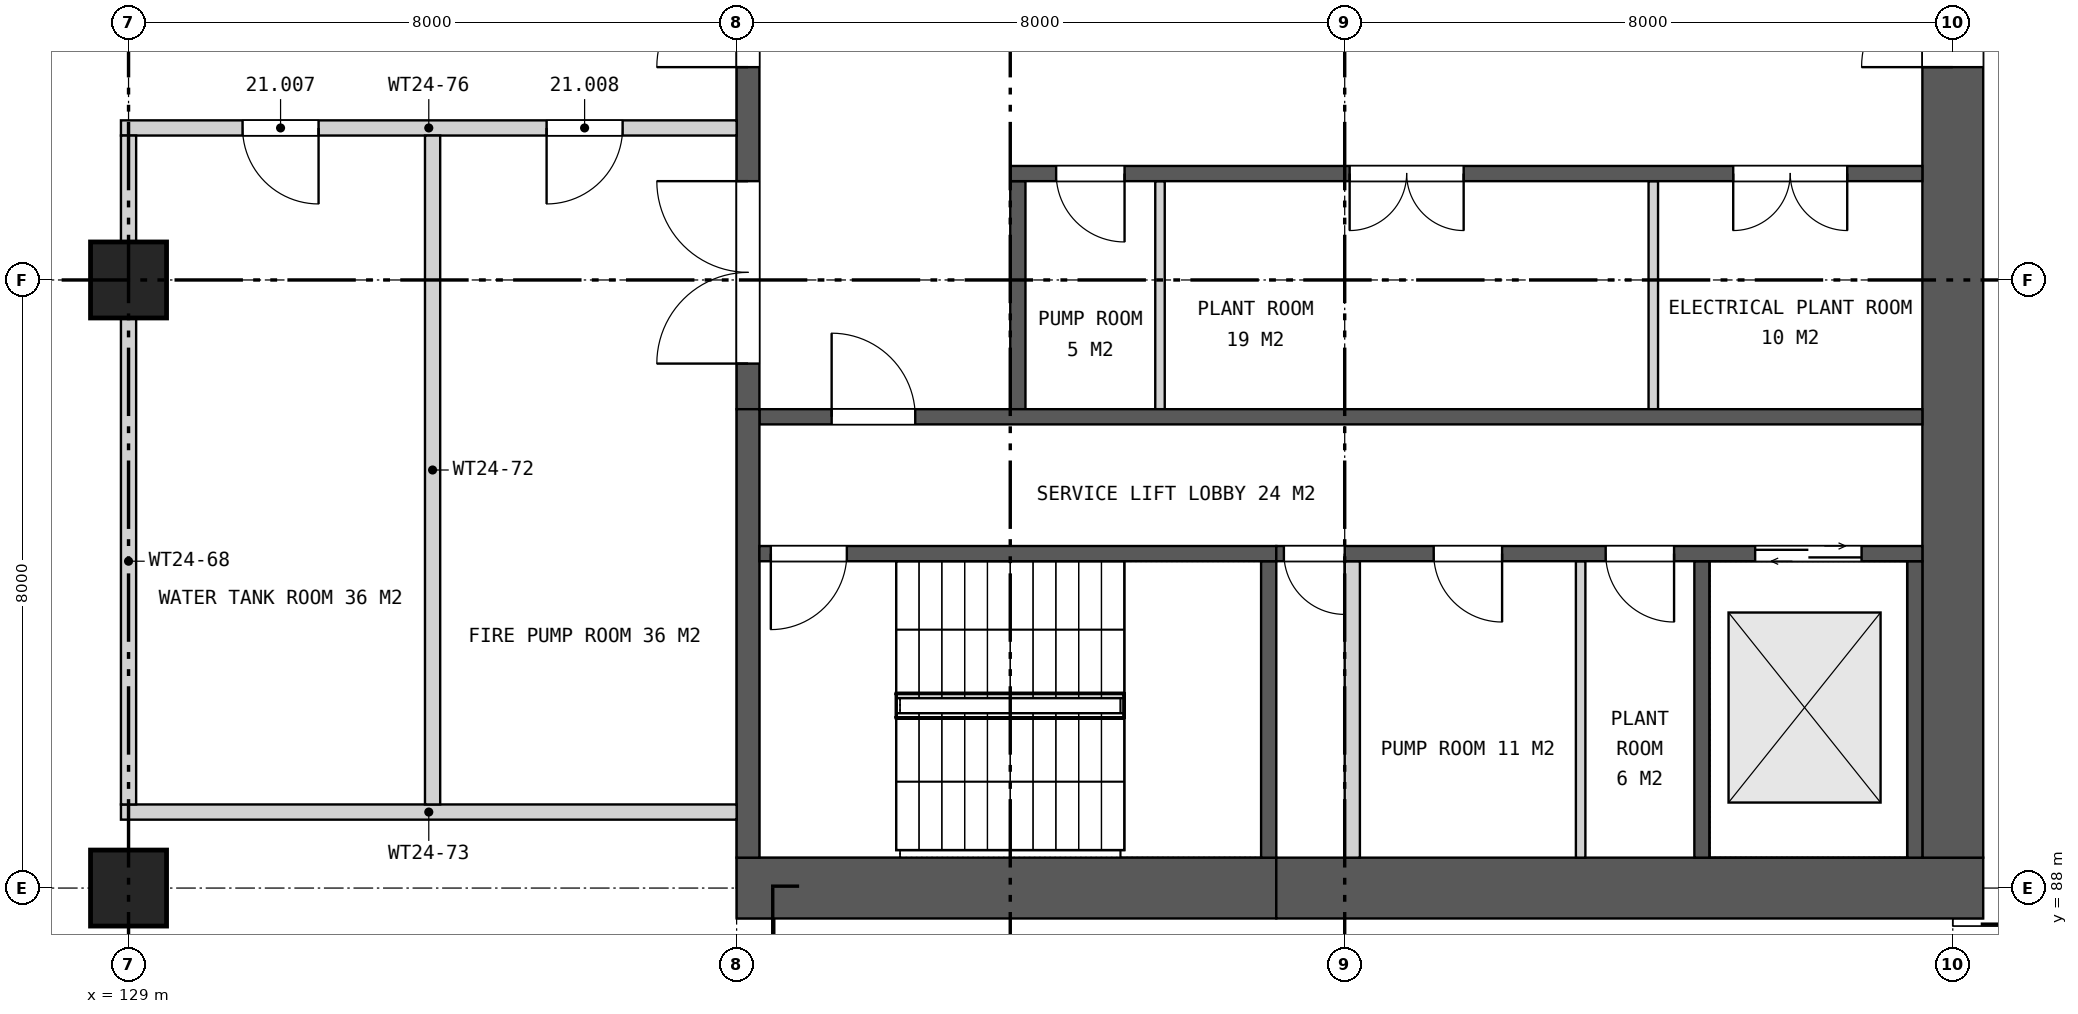
"""IFC4 building model, lengths in metres.
Left out: names, types, materials, properties, quantities, classifications, styles, units other than length and angle.
Written with IfcOpenShell. Run it as: python <this file> out.ifc"""

import sys

from ifc_helpers import new_model, si_unit, direction, frame, frame_2d, origin, origin_2d, place, context, subcontext, project, spatial, rectangle, extrude, element, fill, save


model = new_model("IFC4")
c1 = context("Model", 3, precision=1e-05, world=origin(), true_north=direction((0.0, 1.0)))
c2 = subcontext(c1, "Body", "Model", "MODEL_VIEW")
j1 = project(units=[si_unit("LENGTHUNIT", "METRE"), si_unit("PLANEANGLEUNIT", "RADIAN")], contexts=[c1])
p1 = place(None, origin())
s1 = spatial("IfcSite", under=j1, at=p1, CompositionType="ELEMENT")
p2 = place(p1, origin())
s2 = spatial("IfcBuilding", under=s1, at=p2, CompositionType="ELEMENT")
p3 = place(p2, frame((0.0, 0.0, 105.3)))
s3 = spatial("IfcBuildingStorey", under=s2, at=p3, CompositionType="ELEMENT", Elevation=105.3)
for number, where, z_axis, x_axis in (
    (1, (129.0, 88.0, 0.0), (0.0, 0.0, 1.0), (1.0, 0.0, 0.0)),
    (2, (129.0, 96.0, 0.0), (0.0, 0.0, 1.0), (1.0, 0.0, 0.0)),
):
    element("IfcColumn", number, at=place(p3, frame(where, z_axis=z_axis, x_axis=x_axis)), inside=s3, PredefinedType="COLUMN", context=c2, shape_type="SweptSolid", body=[
        extrude(rectangle(XDim=1.0, YDim=1.0, at=origin_2d()), origin(), (0.0, 0.0, 1.0), 7.4),
    ])
p4 = place(p3, frame((137.0, 88.0, 0.0), z_axis=(0.0, 0.0, 1.0), x_axis=(1.0, 0.0, 0.0)))
e3 = element("IfcWall", 3, at=p4, inside=s3, PredefinedType="SHEAR", context=c2, shape_type="SweptSolid", body=[
    extrude(rectangle(XDim=7.1, YDim=0.8, at=frame_2d((3.55, 0.0))), origin(), (0.0, 0.0, 1.0), 7.4),
])
p5 = place(p3, frame((144.1, 88.0, 0.0), z_axis=(0.0, 0.0, 1.0), x_axis=(1.0, 0.0, 0.0)))
e4 = element("IfcWall", 4, at=p5, inside=s3, PredefinedType="SHEAR", context=c2, shape_type="SweptSolid", body=[
    extrude(rectangle(XDim=9.3, YDim=0.8, at=frame_2d((4.65, 0.0))), origin(), (0.0, 0.0, 1.0), 7.4),
])
p6 = place(p3, frame((153.0, 88.4, 0.0), z_axis=(0.0, 0.0, 1.0), x_axis=(0.0, 1.0, 0.0)))
e5 = element("IfcWall", 5, at=p6, inside=s3, PredefinedType="SHEAR", context=c2, shape_type="SweptSolid", body=[
    extrude(rectangle(XDim=23.2, YDim=0.8, at=frame_2d((11.6, 0.0))), origin(), (0.0, 0.0, 1.0), 7.4),
])
p7 = place(p6, frame((10.4, 0.0, 0.0)))
e6 = element("IfcOpeningElement", 6, at=p7, cuts=e5, PredefinedType="OPENING", context=c2, shape_type="SweptSolid", body=[
    extrude(rectangle(XDim=2.4, YDim=2.4, at=frame_2d((1.2, 1.2))), frame((0.0, 0.41, 0.0), z_axis=(0.0, -1.0, 0.0), x_axis=(1.0, 0.0, 0.0)), (0.0, 0.0, 1.0), 0.82),
])
p8 = place(p3, frame((137.15, 94.3, 0.0), z_axis=(0.0, 0.0, 1.0), x_axis=(0.0, 1.0, 0.0)))
e7 = element("IfcWall", 7, at=p8, inside=s3, PredefinedType="SHEAR", context=c2, shape_type="SweptSolid", body=[
    extrude(rectangle(XDim=11.4, YDim=0.3, at=frame_2d((5.7, 0.0))), origin(), (0.0, 0.0, 1.0), 7.4),
])
p9 = place(p8, frame((0.6, 0.0, 0.0)))
e8 = element("IfcOpeningElement", 8, at=p9, cuts=e7, PredefinedType="OPENING", context=c2, shape_type="SweptSolid", body=[
    extrude(rectangle(XDim=2.4, YDim=2.4, at=frame_2d((1.2, 1.2))), frame((0.0, 0.16, 0.0), z_axis=(0.0, -1.0, 0.0), x_axis=(1.0, 0.0, 0.0)), (0.0, 0.0, 1.0), 0.32),
])
p10 = place(p8, frame((4.5, 0.0, 0.0)))
e9 = element("IfcOpeningElement", 9, at=p10, cuts=e7, PredefinedType="OPENING", context=c2, shape_type="SweptSolid", body=[
    extrude(rectangle(XDim=2.4, YDim=2.4, at=frame_2d((1.2, 1.2))), frame((0.0, 0.16, 0.0), z_axis=(0.0, -1.0, 0.0), x_axis=(1.0, 0.0, 0.0)), (0.0, 0.0, 1.0), 0.32),
])
p11 = place(p8, frame((8.4, 0.0, 0.0)))
e10 = element("IfcOpeningElement", 10, at=p11, cuts=e7, PredefinedType="OPENING", context=c2, shape_type="SweptSolid", body=[
    extrude(rectangle(XDim=2.4, YDim=2.4, at=frame_2d((1.2, 1.2))), frame((0.0, 0.16, 0.0), z_axis=(0.0, -1.0, 0.0), x_axis=(1.0, 0.0, 0.0)), (0.0, 0.0, 1.0), 0.32),
])
p12 = place(p3, frame((140.7, 94.3, 0.0), z_axis=(0.0, 0.0, 1.0), x_axis=(0.0, 1.0, 0.0)))
e11 = element("IfcWall", 11, at=p12, inside=s3, PredefinedType="SHEAR", context=c2, shape_type="SweptSolid", body=[
    extrude(rectangle(XDim=3.0, YDim=0.2, at=frame_2d((1.5, 0.0))), origin(), (0.0, 0.0, 1.0), 7.4),
])
for number, where, z_axis, x_axis in (
    (12, (142.57, 94.3, 0.0), (0.0, 0.0, 1.0), (0.0, 1.0, 0.0)),
    (13, (149.06, 94.3, 0.0), (0.0, 0.0, 1.0), (0.0, 1.0, 0.0)),
):
    element("IfcWall", number, at=place(p3, frame(where, z_axis=z_axis, x_axis=x_axis)), inside=s3, PredefinedType="PARTITIONING", context=c2, shape_type="SweptSolid", body=[
        extrude(rectangle(XDim=3.0, YDim=0.125, at=frame_2d((1.5, 0.0))), origin(), (0.0, 0.0, 1.0), 7.4),
    ])
p13 = place(p3, frame((140.6, 97.4, 0.0), z_axis=(0.0, 0.0, 1.0), x_axis=(1.0, 0.0, 0.0)))
e14 = element("IfcWall", 14, at=p13, inside=s3, PredefinedType="SHEAR", context=c2, shape_type="SweptSolid", body=[
    extrude(rectangle(XDim=12.0, YDim=0.2, at=frame_2d((6.0, 0.0))), origin(), (0.0, 0.0, 1.0), 7.4),
])
p14 = place(p13, frame((0.604, 0.0, 0.0)))
e15 = element("IfcOpeningElement", 15, at=p14, cuts=e14, PredefinedType="OPENING", context=c2, shape_type="SweptSolid", body=[
    extrude(rectangle(XDim=0.9, YDim=2.1, at=frame_2d((0.45, 1.05))), frame((0.0, 0.11, 0.0), z_axis=(0.0, -1.0, 0.0), x_axis=(1.0, 0.0, 0.0)), (0.0, 0.0, 1.0), 0.22),
])
p15 = place(p13, frame((4.465, 0.0, 0.0)))
e16 = element("IfcOpeningElement", 16, at=p15, cuts=e14, PredefinedType="OPENING", context=c2, shape_type="SweptSolid", body=[
    extrude(rectangle(XDim=1.5, YDim=2.1, at=frame_2d((0.75, 1.05))), frame((0.0, 0.11, 0.0), z_axis=(0.0, -1.0, 0.0), x_axis=(1.0, 0.0, 0.0)), (0.0, 0.0, 1.0), 0.22),
])
p16 = place(p13, frame((9.511, 0.0, 0.0)))
e17 = element("IfcOpeningElement", 17, at=p16, cuts=e14, PredefinedType="OPENING", context=c2, shape_type="SweptSolid", body=[
    extrude(rectangle(XDim=1.5, YDim=2.1, at=frame_2d((0.75, 1.05))), frame((0.0, 0.11, 0.0), z_axis=(0.0, -1.0, 0.0), x_axis=(1.0, 0.0, 0.0)), (0.0, 0.0, 1.0), 0.22),
])
p17 = place(p3, frame((137.3, 94.2, 0.0), z_axis=(0.0, 0.0, 1.0), x_axis=(1.0, 0.0, 0.0)))
e18 = element("IfcWall", 18, at=p17, inside=s3, PredefinedType="SHEAR", context=c2, shape_type="SweptSolid", body=[
    extrude(rectangle(XDim=15.3, YDim=0.2, at=frame_2d((7.65, 0.0))), origin(), (0.0, 0.0, 1.0), 7.4),
])
p18 = place(p17, frame((0.95, 0.0, 0.0)))
e19 = element("IfcOpeningElement", 19, at=p18, cuts=e18, PredefinedType="OPENING", context=c2, shape_type="SweptSolid", body=[
    extrude(rectangle(XDim=1.1, YDim=2.1, at=frame_2d((0.55, 1.05))), frame((0.0, 0.11, 0.0), z_axis=(0.0, -1.0, 0.0), x_axis=(1.0, 0.0, 0.0)), (0.0, 0.0, 1.0), 0.22),
])
p19 = place(p3, frame((137.15, 88.4, 0.0), z_axis=(0.0, 0.0, 1.0), x_axis=(0.0, 1.0, 0.0)))
e20 = element("IfcWall", 20, at=p19, inside=s3, PredefinedType="SHEAR", context=c2, shape_type="SweptSolid", body=[
    extrude(rectangle(XDim=5.9, YDim=0.3, at=frame_2d((2.95, 0.0))), origin(), (0.0, 0.0, 1.0), 7.4),
])
for number, where, z_axis, x_axis in (
    (21, (144.0, 88.4, 0.0), (0.0, 0.0, 1.0), (0.0, 1.0, 0.0)),
    (22, (149.7, 88.4, 0.0), (0.0, 0.0, 1.0), (0.0, 1.0, 0.0)),
    (23, (152.5, 88.4, 0.0), (0.0, 0.0, 1.0), (0.0, 1.0, 0.0)),
):
    element("IfcWall", number, at=place(p3, frame(where, z_axis=z_axis, x_axis=x_axis)), inside=s3, PredefinedType="SHEAR", context=c2, shape_type="SweptSolid", body=[
        extrude(rectangle(XDim=3.9, YDim=0.2, at=frame_2d((1.95, 0.0))), origin(), (0.0, 0.0, 1.0), 7.4),
    ])
p20 = place(p3, frame((145.1, 88.4, 0.0), z_axis=(0.0, 0.0, 1.0), x_axis=(0.0, 1.0, 0.0)))
e24 = element("IfcWall", 24, at=p20, inside=s3, PredefinedType="PARTITIONING", context=c2, shape_type="SweptSolid", body=[
    extrude(rectangle(XDim=3.9, YDim=0.2, at=frame_2d((1.95, 0.0))), origin(), (0.0, 0.0, 1.0), 7.4),
])
p21 = place(p3, frame((148.104, 88.4, 0.0), z_axis=(0.0, 0.0, 1.0), x_axis=(0.0, 1.0, 0.0)))
e25 = element("IfcWall", 25, at=p21, inside=s3, PredefinedType="PARTITIONING", context=c2, shape_type="SweptSolid", body=[
    extrude(rectangle(XDim=3.9, YDim=0.125, at=frame_2d((1.95, 0.0))), origin(), (0.0, 0.0, 1.0), 7.4),
])
p22 = place(p3, frame((137.3, 92.4, 0.0), z_axis=(0.0, 0.0, 1.0), x_axis=(1.0, 0.0, 0.0)))
e26 = element("IfcWall", 26, at=p22, inside=s3, PredefinedType="SHEAR", context=c2, shape_type="SweptSolid", body=[
    extrude(rectangle(XDim=6.8, YDim=0.2, at=frame_2d((3.4, 0.0))), origin(), (0.0, 0.0, 1.0), 7.4),
])
p23 = place(p22, frame((0.15, 0.0, 0.0)))
e27 = element("IfcOpeningElement", 27, at=p23, cuts=e26, PredefinedType="OPENING", context=c2, shape_type="SweptSolid", body=[
    extrude(rectangle(XDim=1.0, YDim=2.1, at=frame_2d((0.5, 1.05))), frame((0.0, 0.11, 0.0), z_axis=(0.0, -1.0, 0.0), x_axis=(1.0, 0.0, 0.0)), (0.0, 0.0, 1.0), 0.22),
])
p24 = place(p3, frame((144.1, 92.4, 0.0), z_axis=(0.0, 0.0, 1.0), x_axis=(1.0, 0.0, 0.0)))
e28 = element("IfcWall", 28, at=p24, inside=s3, PredefinedType="SHEAR", context=c2, shape_type="SweptSolid", body=[
    extrude(rectangle(XDim=8.5, YDim=0.2, at=frame_2d((4.25, 0.0))), origin(), (0.0, 0.0, 1.0), 7.4),
])
p25 = place(p24, frame((0.1, 0.0, 0.0)))
e29 = element("IfcOpeningElement", 29, at=p25, cuts=e28, PredefinedType="OPENING", context=c2, shape_type="SweptSolid", body=[
    extrude(rectangle(XDim=0.8, YDim=2.1, at=frame_2d((0.4, 1.05))), frame((0.0, 0.11, 0.0), z_axis=(0.0, -1.0, 0.0), x_axis=(1.0, 0.0, 0.0)), (0.0, 0.0, 1.0), 0.22),
])
p26 = place(p24, frame((2.071, 0.0, 0.0)))
e30 = element("IfcOpeningElement", 30, at=p26, cuts=e28, PredefinedType="OPENING", context=c2, shape_type="SweptSolid", body=[
    extrude(rectangle(XDim=0.9, YDim=2.1, at=frame_2d((0.45, 1.05))), frame((0.0, 0.11, 0.0), z_axis=(0.0, -1.0, 0.0), x_axis=(1.0, 0.0, 0.0)), (0.0, 0.0, 1.0), 0.22),
])
p27 = place(p24, frame((4.333, 0.0, 0.0)))
e31 = element("IfcOpeningElement", 31, at=p27, cuts=e28, PredefinedType="OPENING", context=c2, shape_type="SweptSolid", body=[
    extrude(rectangle(XDim=0.9, YDim=2.1, at=frame_2d((0.45, 1.05))), frame((0.0, 0.11, 0.0), z_axis=(0.0, -1.0, 0.0), x_axis=(1.0, 0.0, 0.0)), (0.0, 0.0, 1.0), 0.22),
])
p28 = place(p24, frame((6.3, 0.0, 0.0)))
e32 = element("IfcOpeningElement", 32, at=p28, cuts=e28, PredefinedType="OPENING", context=c2, shape_type="SweptSolid", body=[
    extrude(rectangle(XDim=1.4, YDim=2.1, at=frame_2d((0.7, 1.05))), frame((0.0, 0.11, 0.0), z_axis=(0.0, -1.0, 0.0), x_axis=(1.0, 0.0, 0.0)), (0.0, 0.0, 1.0), 0.22),
])
p29 = place(p3, frame((128.9, 89.0, 0.0), z_axis=(0.0, 0.0, 1.0), x_axis=(1.0, 0.0, 0.0)))
e33 = element("IfcWall", 33, at=p29, inside=s3, PredefinedType="SOLIDWALL", context=c2, shape_type="SweptSolid", body=[
    extrude(rectangle(XDim=8.1, YDim=0.2, at=frame_2d((4.05, 0.0))), origin(), (0.0, 0.0, 1.0), 6.64),
])
p30 = place(p3, frame((128.9, 98.0, 0.0), z_axis=(0.0, 0.0, 1.0), x_axis=(1.0, 0.0, 0.0)))
e34 = element("IfcWall", 34, at=p30, inside=s3, PredefinedType="SOLIDWALL", context=c2, shape_type="SweptSolid", body=[
    extrude(rectangle(XDim=8.1, YDim=0.2, at=frame_2d((4.05, 0.0))), origin(), (0.0, 0.0, 1.0), 6.64),
])
p31 = place(p30, frame((1.6, 0.0, 0.0)))
e35 = element("IfcOpeningElement", 35, at=p31, cuts=e34, PredefinedType="OPENING", context=c2, shape_type="SweptSolid", body=[
    extrude(rectangle(XDim=1.0, YDim=2.2, at=frame_2d((0.5, 1.1))), frame((0.0, 0.11, 0.0), z_axis=(0.0, -1.0, 0.0), x_axis=(1.0, 0.0, 0.0)), (0.0, 0.0, 1.0), 0.22),
])
p32 = place(p30, frame((5.6, 0.0, 0.0)))
e36 = element("IfcOpeningElement", 36, at=p32, cuts=e34, PredefinedType="OPENING", context=c2, shape_type="SweptSolid", body=[
    extrude(rectangle(XDim=1.0, YDim=2.2, at=frame_2d((0.5, 1.1))), frame((0.0, 0.11, 0.0), z_axis=(0.0, -1.0, 0.0), x_axis=(1.0, 0.0, 0.0)), (0.0, 0.0, 1.0), 0.22),
])
p33 = place(p3, frame((129.0, 89.1, 0.0), z_axis=(0.0, 0.0, 1.0), x_axis=(0.0, 1.0, 0.0)))
e37 = element("IfcWall", 37, at=p33, inside=s3, PredefinedType="SOLIDWALL", context=c2, shape_type="SweptSolid", body=[
    extrude(rectangle(XDim=6.4, YDim=0.2, at=frame_2d((3.2, 0.0))), origin(), (0.0, 0.0, 1.0), 6.64),
])
p34 = place(p3, frame((129.0, 96.5, 0.0), z_axis=(0.0, 0.0, 1.0), x_axis=(0.0, 1.0, 0.0)))
e38 = element("IfcWall", 38, at=p34, inside=s3, PredefinedType="SOLIDWALL", context=c2, shape_type="SweptSolid", body=[
    extrude(rectangle(XDim=1.4, YDim=0.2, at=frame_2d((0.7, 0.0))), origin(), (0.0, 0.0, 1.0), 6.64),
])
p35 = place(p3, frame((133.0, 89.1, 0.0), z_axis=(0.0, 0.0, 1.0), x_axis=(0.0, 1.0, 0.0)))
e39 = element("IfcWall", 39, at=p35, inside=s3, PredefinedType="SOLIDWALL", context=c2, shape_type="SweptSolid", body=[
    extrude(rectangle(XDim=8.8, YDim=0.2, at=frame_2d((4.4, 0.0))), origin(), (0.0, 0.0, 1.0), 6.636),
])
p36 = place(p7, origin())
e40 = element("IfcDoor", 40, at=p36, inside=s3, OperationType="DOUBLE_DOOR_SINGLE_SWING", PredefinedType="DOOR", context=c2, shape_type="SweptSolid", body=[
    extrude(rectangle(XDim=2.4, YDim=2.4, at=frame_2d((1.2, 1.2))), frame((0.0, 0.025, 0.0), z_axis=(0.0, -1.0, 0.0), x_axis=(1.0, 0.0, 0.0)), (0.0, 0.0, 1.0), 0.05),
])
fill(e6, e40)
p37 = place(p9, origin())
e41 = element("IfcDoor", 41, at=p37, inside=s3, OperationType="DOUBLE_DOOR_SINGLE_SWING", PredefinedType="DOOR", context=c2, shape_type="SweptSolid", body=[
    extrude(rectangle(XDim=2.4, YDim=2.4, at=frame_2d((1.2, 1.2))), frame((0.0, 0.025, 0.0), z_axis=(0.0, -1.0, 0.0), x_axis=(1.0, 0.0, 0.0)), (0.0, 0.0, 1.0), 0.05),
])
fill(e8, e41)
p38 = place(p10, origin())
e42 = element("IfcDoor", 42, at=p38, inside=s3, OperationType="DOUBLE_DOOR_SINGLE_SWING", PredefinedType="DOOR", context=c2, shape_type="SweptSolid", body=[
    extrude(rectangle(XDim=2.4, YDim=2.4, at=frame_2d((1.2, 1.2))), frame((0.0, 0.025, 0.0), z_axis=(0.0, -1.0, 0.0), x_axis=(1.0, 0.0, 0.0)), (0.0, 0.0, 1.0), 0.05),
])
fill(e9, e42)
p39 = place(p14, frame((0.9, 0.0, 0.0), z_axis=(0.0, 0.0, 1.0), x_axis=(-1.0, 0.0, 0.0)))
e43 = element("IfcDoor", 43, at=p39, inside=s3, OperationType="SINGLE_SWING_LEFT", PredefinedType="DOOR", context=c2, shape_type="SweptSolid", body=[
    extrude(rectangle(XDim=0.9, YDim=2.1, at=frame_2d((0.45, 1.05))), frame((0.0, 0.025, 0.0), z_axis=(0.0, -1.0, 0.0), x_axis=(1.0, 0.0, 0.0)), (0.0, 0.0, 1.0), 0.05),
])
fill(e15, e43)
p40 = place(p15, frame((1.5, 0.0, 0.0), z_axis=(0.0, 0.0, 1.0), x_axis=(-1.0, 0.0, 0.0)))
e44 = element("IfcDoor", 44, at=p40, inside=s3, OperationType="DOUBLE_DOOR_SINGLE_SWING", PredefinedType="DOOR", context=c2, shape_type="SweptSolid", body=[
    extrude(rectangle(XDim=1.5, YDim=2.1, at=frame_2d((0.75, 1.05))), frame((0.0, 0.025, 0.0), z_axis=(0.0, -1.0, 0.0), x_axis=(1.0, 0.0, 0.0)), (0.0, 0.0, 1.0), 0.05),
])
fill(e16, e44)
p41 = place(p16, frame((1.5, 0.0, 0.0), z_axis=(0.0, 0.0, 1.0), x_axis=(-1.0, 0.0, 0.0)))
e45 = element("IfcDoor", 45, at=p41, inside=s3, OperationType="DOUBLE_DOOR_SINGLE_SWING", PredefinedType="DOOR", context=c2, shape_type="SweptSolid", body=[
    extrude(rectangle(XDim=1.5, YDim=2.1, at=frame_2d((0.75, 1.05))), frame((0.0, 0.025, 0.0), z_axis=(0.0, -1.0, 0.0), x_axis=(1.0, 0.0, 0.0)), (0.0, 0.0, 1.0), 0.05),
])
fill(e17, e45)
p42 = place(p18, origin())
e46 = element("IfcDoor", 46, at=p42, inside=s3, OperationType="SINGLE_SWING_LEFT", PredefinedType="DOOR", context=c2, shape_type="SweptSolid", body=[
    extrude(rectangle(XDim=1.1, YDim=2.1, at=frame_2d((0.55, 1.05))), frame((0.0, 0.025, 0.0), z_axis=(0.0, -1.0, 0.0), x_axis=(1.0, 0.0, 0.0)), (0.0, 0.0, 1.0), 0.05),
])
fill(e19, e46)
p43 = place(p23, frame((1.0, 0.0, 0.0), z_axis=(0.0, 0.0, 1.0), x_axis=(-1.0, 0.0, 0.0)))
e47 = element("IfcDoor", 47, at=p43, inside=s3, OperationType="SINGLE_SWING_RIGHT", PredefinedType="DOOR", context=c2, shape_type="SweptSolid", body=[
    extrude(rectangle(XDim=1.0, YDim=2.1, at=frame_2d((0.5, 1.05))), frame((0.0, 0.025, 0.0), z_axis=(0.0, -1.0, 0.0), x_axis=(1.0, 0.0, 0.0)), (0.0, 0.0, 1.0), 0.05),
])
fill(e27, e47)
p44 = place(p25, frame((0.8, 0.0, 0.0), z_axis=(0.0, 0.0, 1.0), x_axis=(-1.0, 0.0, 0.0)))
e48 = element("IfcDoor", 48, at=p44, inside=s3, OperationType="SINGLE_SWING_LEFT", PredefinedType="DOOR", context=c2, shape_type="SweptSolid", body=[
    extrude(rectangle(XDim=0.8, YDim=2.1, at=frame_2d((0.4, 1.05))), frame((0.0, 0.025, 0.0), z_axis=(0.0, -1.0, 0.0), x_axis=(1.0, 0.0, 0.0)), (0.0, 0.0, 1.0), 0.05),
])
fill(e29, e48)
p45 = place(p26, frame((0.9, 0.0, 0.0), z_axis=(0.0, 0.0, 1.0), x_axis=(-1.0, 0.0, 0.0)))
e49 = element("IfcDoor", 49, at=p45, inside=s3, OperationType="SINGLE_SWING_LEFT", PredefinedType="DOOR", context=c2, shape_type="SweptSolid", body=[
    extrude(rectangle(XDim=0.9, YDim=2.1, at=frame_2d((0.45, 1.05))), frame((0.0, 0.025, 0.0), z_axis=(0.0, -1.0, 0.0), x_axis=(1.0, 0.0, 0.0)), (0.0, 0.0, 1.0), 0.05),
])
fill(e30, e49)
p46 = place(p27, frame((0.9, 0.0, 0.0), z_axis=(0.0, 0.0, 1.0), x_axis=(-1.0, 0.0, 0.0)))
e50 = element("IfcDoor", 50, at=p46, inside=s3, OperationType="SINGLE_SWING_LEFT", PredefinedType="DOOR", context=c2, shape_type="SweptSolid", body=[
    extrude(rectangle(XDim=0.9, YDim=2.1, at=frame_2d((0.45, 1.05))), frame((0.0, 0.025, 0.0), z_axis=(0.0, -1.0, 0.0), x_axis=(1.0, 0.0, 0.0)), (0.0, 0.0, 1.0), 0.05),
])
fill(e31, e50)
p47 = place(p28, origin())
e51 = element("IfcDoor", 51, at=p47, inside=s3, OperationType="DOUBLE_DOOR_SLIDING", PredefinedType="DOOR", context=c2, shape_type="SweptSolid", body=[
    extrude(rectangle(XDim=1.4, YDim=2.1, at=frame_2d((0.7, 1.05))), frame((0.0, 0.025, 0.0), z_axis=(0.0, -1.0, 0.0), x_axis=(1.0, 0.0, 0.0)), (0.0, 0.0, 1.0), 0.05),
])
fill(e32, e51)
p48 = place(p31, frame((1.0, 0.0, 0.0), z_axis=(0.0, 0.0, 1.0), x_axis=(-1.0, 0.0, 0.0)))
e52 = element("IfcDoor", 52, at=p48, inside=s3, OperationType="SINGLE_SWING_LEFT", PredefinedType="DOOR", context=c2, shape_type="SweptSolid", body=[
    extrude(rectangle(XDim=1.0, YDim=2.2, at=frame_2d((0.5, 1.1))), frame((0.0, 0.025, 0.0), z_axis=(0.0, -1.0, 0.0), x_axis=(1.0, 0.0, 0.0)), (0.0, 0.0, 1.0), 0.05),
])
fill(e35, e52)
p49 = place(p32, frame((1.0, 0.0, 0.0), z_axis=(0.0, 0.0, 1.0), x_axis=(-1.0, 0.0, 0.0)))
e53 = element("IfcDoor", 53, at=p49, inside=s3, OperationType="SINGLE_SWING_RIGHT", PredefinedType="DOOR", context=c2, shape_type="SweptSolid", body=[
    extrude(rectangle(XDim=1.0, YDim=2.2, at=frame_2d((0.5, 1.1))), frame((0.0, 0.025, 0.0), z_axis=(0.0, -1.0, 0.0), x_axis=(1.0, 0.0, 0.0)), (0.0, 0.0, 1.0), 0.05),
])
fill(e36, e53)
save(model, sys.argv[1])
